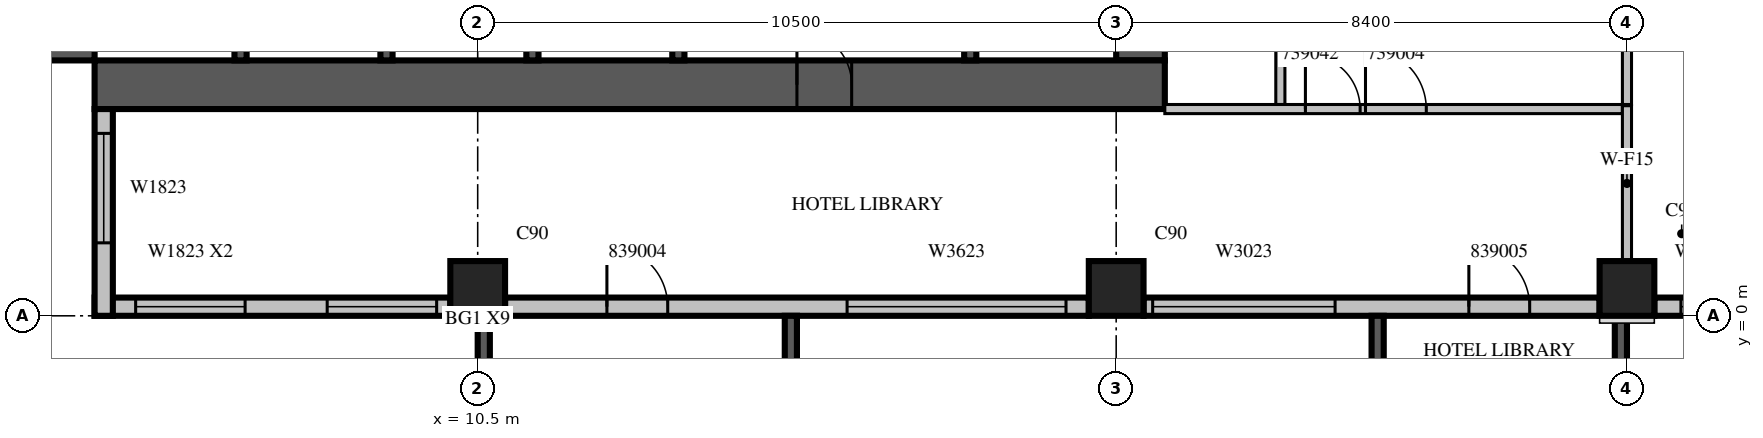
"""IFC4 building model, lengths in metres.
Left out: names, types, materials, properties, quantities, classifications, styles, units other than length and angle.
Written with IfcOpenShell. Run it as: python <this file> out.ifc"""

import sys

from ifc_helpers import new_model, si_unit, direction, frame, frame_2d, origin, origin_2d, place, context, subcontext, project, spatial, rectangle, extrude, source, transform, mapped, element, fill, save


model = new_model("IFC4")
c1 = context("Model", 3, precision=1e-05, world=origin(), true_north=direction((0.0, 1.0)))
c2 = subcontext(c1, "Body", "Model", "MODEL_VIEW")
j1 = project(units=[si_unit("LENGTHUNIT", "METRE"), si_unit("PLANEANGLEUNIT", "RADIAN")], contexts=[c1])
p1 = place(None, origin())
s1 = spatial("IfcSite", under=j1, at=p1, CompositionType="ELEMENT")
p2 = place(p1, origin())
s2 = spatial("IfcBuilding", under=s1, at=p2, CompositionType="ELEMENT")
p3 = place(p2, frame((0.0, 0.0, 181.6)))
s3 = spatial("IfcBuildingStorey", under=s2, at=p3, CompositionType="ELEMENT", Elevation=181.6)
m1 = source(origin(), c2, "Body", "SweptSolid", [
    extrude(rectangle(XDim=0.9, YDim=0.9, at=origin_2d()), origin(), (0.0, 0.0, 1.0), 3.8),
])
for number, where, z_axis, x_axis in (
    (1, (10.5, 0.45, 0.0), (0.0, 0.0, 1.0), (1.0, 0.0, 0.0)),
    (2, (21.0, 0.45, 0.0), (0.0, 0.0, 1.0), (1.0, 0.0, 0.0)),
    (3, (29.4, 0.45, 0.0), (0.0, 0.0, 1.0), (1.0, 0.0, 0.0)),
):
    element("IfcColumn", number, at=place(p3, frame(where, z_axis=z_axis, x_axis=x_axis)), inside=s3, PredefinedType="COLUMN", context=c2, shape_type="MappedRepresentation", body=[
        mapped(m1, transform((0.0, 0.0, 0.0), scale=1.0)),
    ])
m2 = source(origin(), c2, "Body", "SweptSolid", [
    extrude(rectangle(XDim=17.6, YDim=0.8, at=frame_2d((8.8, 0.0))), origin(), (0.0, 0.0, 1.0), 3.8),
])
p4 = place(p3, frame((3.8, 4.2, 0.0), z_axis=(0.0, 0.0, 1.0), x_axis=(0.0, 1.0, 0.0)))
e4 = element("IfcWall", 4, at=p4, inside=s3, PredefinedType="SHEAR", context=c2, shape_type="MappedRepresentation", body=[
    mapped(m2, transform((0.0, 0.0, 0.0), scale=1.0)),
])
m3 = source(origin(), c2, "Body", "SweptSolid", [
    extrude(rectangle(XDim=2.2, YDim=2.1, at=frame_2d((1.1, 1.05))), frame((0.0, 0.41, 0.0), z_axis=(0.0, -1.0, 0.0), x_axis=(1.0, 0.0, 0.0)), (0.0, 0.0, 1.0), 0.82),
])
p5 = place(p4, frame((4.2, 0.0, 0.0)))
e5 = element("IfcOpeningElement", 5, at=p5, cuts=e4, PredefinedType="OPENING", context=c2, shape_type="MappedRepresentation", body=[
    mapped(m3, transform((0.0, 0.0, 0.0), scale=1.0)),
])
m4 = source(origin(), c2, "Body", "SweptSolid", [
    extrude(rectangle(XDim=0.9, YDim=2.1, at=frame_2d((0.45, 1.05))), frame((0.0, 0.41, 0.0), z_axis=(0.0, -1.0, 0.0), x_axis=(1.0, 0.0, 0.0)), (0.0, 0.0, 1.0), 0.82),
])
p6 = place(p4, frame((10.95, 0.0, 0.0)))
e6 = element("IfcOpeningElement", 6, at=p6, cuts=e4, PredefinedType="OPENING", context=c2, shape_type="MappedRepresentation", body=[
    mapped(m4, transform((0.0, 0.0, 0.0), scale=1.0)),
])
m5 = source(origin(), c2, "Body", "SweptSolid", [
    extrude(rectangle(XDim=16.8, YDim=0.8, at=frame_2d((8.4, 0.0))), origin(), (0.0, 0.0, 1.0), 3.8),
])
p7 = place(p3, frame((21.4, 4.2, 0.0), z_axis=(0.0, 0.0, 1.0), x_axis=(0.0, 1.0, 0.0)))
e7 = element("IfcWall", 7, at=p7, inside=s3, PredefinedType="SHEAR", context=c2, shape_type="MappedRepresentation", body=[
    mapped(m5, transform((0.0, 0.0, 0.0), scale=1.0)),
])
p8 = place(p7, frame((4.2, 0.0, 0.0)))
e8 = element("IfcOpeningElement", 8, at=p8, cuts=e7, PredefinedType="OPENING", context=c2, shape_type="MappedRepresentation", body=[
    mapped(m3, transform((0.0, 0.0, 0.0), scale=1.0)),
])
m6 = source(origin(), c2, "Body", "SweptSolid", [
    extrude(rectangle(XDim=1.2, YDim=2.1, at=frame_2d((0.6, 1.05))), frame((0.0, 0.41, 0.0), z_axis=(0.0, -1.0, 0.0), x_axis=(1.0, 0.0, 0.0)), (0.0, 0.0, 1.0), 0.82),
])
p9 = place(p7, frame((14.7, 0.0, 0.0)))
e9 = element("IfcOpeningElement", 9, at=p9, cuts=e7, PredefinedType="OPENING", context=c2, shape_type="MappedRepresentation", body=[
    mapped(m6, transform((0.0, 0.0, 0.0), scale=1.0)),
])
p10 = place(p3, frame((4.2, 3.8, 0.0), z_axis=(0.0, 0.0, 1.0), x_axis=(1.0, 0.0, 0.0)))
e10 = element("IfcWall", 10, at=p10, inside=s3, PredefinedType="SHEAR", context=c2, shape_type="MappedRepresentation", body=[
    mapped(m2, transform((0.0, 0.0, 0.0), scale=1.0)),
])
p11 = place(p10, frame((11.55, 0.0, 0.0)))
e11 = element("IfcOpeningElement", 11, at=p11, cuts=e10, PredefinedType="OPENING", context=c2, shape_type="MappedRepresentation", body=[
    mapped(m4, transform((0.0, 0.0, 0.0), scale=1.0)),
])
p12 = place(p3, frame((4.2, 0.15, 0.0), z_axis=(0.0, 0.0, 1.0), x_axis=(1.0, 0.0, 0.0)))
e12 = element("IfcWall", 12, at=p12, inside=s3, PredefinedType="STANDARD", context=c2, shape_type="SweptSolid", body=[
    extrude(rectangle(XDim=5.85, YDim=0.3, at=frame_2d((2.925, 0.0))), origin(), (0.0, 0.0, 1.0), 3.4),
])
m7 = source(origin(), c2, "Body", "SweptSolid", [
    extrude(rectangle(XDim=1.8, YDim=2.3, at=frame_2d((0.9, 1.15))), frame((0.0, 0.16, 0.0), z_axis=(0.0, -1.0, 0.0), x_axis=(1.0, 0.0, 0.0)), (0.0, 0.0, 1.0), 0.32),
])
p13 = place(p12, frame((0.675, 0.0, 0.6)))
e13 = element("IfcOpeningElement", 13, at=p13, cuts=e12, PredefinedType="OPENING", context=c2, shape_type="MappedRepresentation", body=[
    mapped(m7, transform((0.0, 0.0, 0.0), scale=1.0)),
])
p14 = place(p12, frame((3.825, 0.0, 0.6)))
e14 = element("IfcOpeningElement", 14, at=p14, cuts=e12, PredefinedType="OPENING", context=c2, shape_type="MappedRepresentation", body=[
    mapped(m7, transform((0.0, 0.0, 0.0), scale=1.0)),
])
p15 = place(p3, frame((10.95, 0.15, 0.0), z_axis=(0.0, 0.0, 1.0), x_axis=(1.0, 0.0, 0.0)))
e15 = element("IfcWall", 15, at=p15, inside=s3, PredefinedType="STANDARD", context=c2, shape_type="SweptSolid", body=[
    extrude(rectangle(XDim=9.6, YDim=0.3, at=frame_2d((4.8, 0.0))), origin(), (0.0, 0.0, 1.0), 3.4),
])
m8 = source(origin(), c2, "Body", "SweptSolid", [
    extrude(rectangle(XDim=3.6, YDim=2.3, at=frame_2d((1.8, 1.15))), frame((0.0, 0.16, 0.0), z_axis=(0.0, -1.0, 0.0), x_axis=(1.0, 0.0, 0.0)), (0.0, 0.0, 1.0), 0.32),
])
p16 = place(p15, frame((5.625, 0.0, 0.6)))
e16 = element("IfcOpeningElement", 16, at=p16, cuts=e15, PredefinedType="OPENING", context=c2, shape_type="MappedRepresentation", body=[
    mapped(m8, transform((0.0, 0.0, 0.0), scale=1.0)),
])
m9 = source(origin(), c2, "Body", "SweptSolid", [
    extrude(rectangle(XDim=1.0, YDim=2.1, at=frame_2d((0.5, 1.05))), frame((0.0, 0.16, 0.0), z_axis=(0.0, -1.0, 0.0), x_axis=(1.0, 0.0, 0.0)), (0.0, 0.0, 1.0), 0.32),
])
p17 = place(p15, frame((1.675, 0.0, 0.0)))
e17 = element("IfcOpeningElement", 17, at=p17, cuts=e15, PredefinedType="OPENING", context=c2, shape_type="MappedRepresentation", body=[
    mapped(m9, transform((0.0, 0.0, 0.0), scale=1.0)),
])
m10 = source(origin(), c2, "Body", "SweptSolid", [
    extrude(rectangle(XDim=7.5, YDim=0.3, at=frame_2d((3.75, 0.0))), origin(), (0.0, 0.0, 1.0), 3.4),
])
p18 = place(p3, frame((21.45, 0.15, 0.0), z_axis=(0.0, 0.0, 1.0), x_axis=(1.0, 0.0, 0.0)))
e18 = element("IfcWall", 18, at=p18, inside=s3, PredefinedType="STANDARD", context=c2, shape_type="MappedRepresentation", body=[
    mapped(m10, transform((0.0, 0.0, 0.0), scale=1.0)),
])
m11 = source(origin(), c2, "Body", "SweptSolid", [
    extrude(rectangle(XDim=3.0, YDim=2.3, at=frame_2d((1.5, 1.15))), frame((0.0, 0.16, 0.0), z_axis=(0.0, -1.0, 0.0), x_axis=(1.0, 0.0, 0.0)), (0.0, 0.0, 1.0), 0.32),
])
p19 = place(p18, frame((0.15, 0.0, 0.6)))
e19 = element("IfcOpeningElement", 19, at=p19, cuts=e18, PredefinedType="OPENING", context=c2, shape_type="MappedRepresentation", body=[
    mapped(m11, transform((0.0, 0.0, 0.0), scale=1.0)),
])
p20 = place(p18, frame((5.35, 0.0, 0.0)))
e20 = element("IfcOpeningElement", 20, at=p20, cuts=e18, PredefinedType="OPENING", context=c2, shape_type="MappedRepresentation", body=[
    mapped(m9, transform((0.0, 0.0, 0.0), scale=1.0)),
])
p21 = place(p3, frame((29.85, 0.15, 0.0), z_axis=(0.0, 0.0, 1.0), x_axis=(1.0, 0.0, 0.0)))
e21 = element("IfcWall", 21, at=p21, inside=s3, PredefinedType="STANDARD", context=c2, shape_type="MappedRepresentation", body=[
    mapped(m10, transform((0.0, 0.0, 0.0), scale=1.0)),
])
m12 = source(origin(), c2, "Body", "SweptSolid", [
    extrude(rectangle(XDim=1.2, YDim=2.3, at=frame_2d((0.6, 1.15))), frame((0.0, 0.16, 0.0), z_axis=(0.0, -1.0, 0.0), x_axis=(1.0, 0.0, 0.0)), (0.0, 0.0, 1.0), 0.32),
])
p22 = place(p21, frame((0.438, 0.0, 0.6)))
e22 = element("IfcOpeningElement", 22, at=p22, cuts=e21, PredefinedType="OPENING", context=c2, shape_type="MappedRepresentation", body=[
    mapped(m12, transform((0.0, 0.0, 0.0), scale=1.0)),
])
p23 = place(p21, frame((5.963, 0.0, 0.6)))
e23 = element("IfcOpeningElement", 23, at=p23, cuts=e21, PredefinedType="OPENING", context=c2, shape_type="MappedRepresentation", body=[
    mapped(m12, transform((0.0, 0.0, 0.0), scale=1.0)),
])
m13 = source(origin(), c2, "Body", "SweptSolid", [
    extrude(rectangle(XDim=3.4, YDim=0.3, at=frame_2d((1.7, 0.0))), origin(), (0.0, 0.0, 1.0), 3.4),
])
p24 = place(p3, frame((4.35, 3.4, 0.0), z_axis=(0.0, 0.0, 1.0), x_axis=(0.0, -1.0, 0.0)))
e24 = element("IfcWall", 24, at=p24, inside=s3, PredefinedType="STANDARD", context=c2, shape_type="MappedRepresentation", body=[
    mapped(m13, transform((0.0, 0.0, 0.0), scale=1.0)),
])
p25 = place(p24, frame((0.4, 0.0, 0.6)))
e25 = element("IfcOpeningElement", 25, at=p25, cuts=e24, PredefinedType="OPENING", context=c2, shape_type="MappedRepresentation", body=[
    mapped(m7, transform((0.0, 0.0, 0.0), scale=1.0)),
])
m14 = source(origin(), c2, "Body", "SweptSolid", [
    extrude(rectangle(XDim=3.9, YDim=0.2, at=frame_2d((1.95, 0.0))), origin(), (0.0, 0.0, 1.0), 3.39),
])
p26 = place(p3, frame((10.6, 0.0, 0.0), z_axis=(0.0, 0.0, 1.0), x_axis=(0.0, -1.0, 0.0)))
e26 = element("IfcWall", 26, at=p26, inside=s3, PredefinedType="SOLIDWALL", context=c2, shape_type="MappedRepresentation", body=[
    mapped(m14, transform((0.0, 0.0, 0.0), scale=1.0)),
])
m15 = source(origin(), c2, "Body", "SweptSolid", [
    extrude(rectangle(XDim=2.4, YDim=2.3, at=frame_2d((1.2, 1.15))), frame((0.0, 0.11, 0.0), z_axis=(0.0, -1.0, 0.0), x_axis=(1.0, 0.0, 0.0)), (0.0, 0.0, 1.0), 0.22),
])
p27 = place(p26, frame((0.75, 0.0, 0.6)))
e27 = element("IfcOpeningElement", 27, at=p27, cuts=e26, PredefinedType="OPENING", context=c2, shape_type="MappedRepresentation", body=[
    mapped(m15, transform((0.0, 0.0, 0.0), scale=1.0)),
])
p28 = place(p3, frame((15.65, 0.0, 0.0), z_axis=(0.0, 0.0, 1.0), x_axis=(0.0, -1.0, 0.0)))
e28 = element("IfcWall", 28, at=p28, inside=s3, PredefinedType="SOLIDWALL", context=c2, shape_type="MappedRepresentation", body=[
    mapped(m14, transform((0.0, 0.0, 0.0), scale=1.0)),
])
p29 = place(p28, frame((0.75, 0.0, 0.6)))
e29 = element("IfcOpeningElement", 29, at=p29, cuts=e28, PredefinedType="OPENING", context=c2, shape_type="MappedRepresentation", body=[
    mapped(m15, transform((0.0, 0.0, 0.0), scale=1.0)),
])
p30 = place(p3, frame((25.3, 0.0, 0.0), z_axis=(0.0, 0.0, 1.0), x_axis=(0.0, -1.0, 0.0)))
e30 = element("IfcWall", 30, at=p30, inside=s3, PredefinedType="SOLIDWALL", context=c2, shape_type="MappedRepresentation", body=[
    mapped(m14, transform((0.0, 0.0, 0.0), scale=1.0)),
])
p31 = place(p30, frame((0.75, 0.0, 0.6)))
e31 = element("IfcOpeningElement", 31, at=p31, cuts=e30, PredefinedType="OPENING", context=c2, shape_type="MappedRepresentation", body=[
    mapped(m15, transform((0.0, 0.0, 0.0), scale=1.0)),
])
p32 = place(p3, frame((29.3, 0.0, 0.0), z_axis=(0.0, 0.0, 1.0), x_axis=(0.0, -1.0, 0.0)))
e32 = element("IfcWall", 32, at=p32, inside=s3, PredefinedType="SOLIDWALL", context=c2, shape_type="MappedRepresentation", body=[
    mapped(m14, transform((0.0, 0.0, 0.0), scale=1.0)),
])
p33 = place(p32, frame((0.75, 0.0, 0.6)))
e33 = element("IfcOpeningElement", 33, at=p33, cuts=e32, PredefinedType="OPENING", context=c2, shape_type="MappedRepresentation", body=[
    mapped(m15, transform((0.0, 0.0, 0.0), scale=1.0)),
])
m16 = source(origin(), c2, "Body", "SweptSolid", [
    extrude(rectangle(XDim=3.1, YDim=0.2, at=frame_2d((1.55, 0.0))), origin(), (0.0, 0.0, 1.0), 3.8),
])
for number, where, z_axis, x_axis in (
    (34, (6.6, 4.2, 0.0), (0.0, 0.0, 1.0), (0.0, 1.0, 0.0)),
    (35, (9.0, 4.2, 0.0), (0.0, 0.0, 1.0), (0.0, 1.0, 0.0)),
    (36, (11.4, 4.2, 0.0), (0.0, 0.0, 1.0), (0.0, 1.0, 0.0)),
):
    element("IfcWall", number, at=place(p3, frame(where, z_axis=z_axis, x_axis=x_axis)), inside=s3, PredefinedType="SOLIDWALL", context=c2, shape_type="MappedRepresentation", body=[
        mapped(m16, transform((0.0, 0.0, 0.0), scale=1.0)),
    ])
m17 = source(origin(), c2, "Body", "SweptSolid", [
    extrude(rectangle(XDim=3.1, YDim=0.2, at=frame_2d((1.55, 0.0))), origin(), (0.0, 0.0, 1.0), 3.4),
])
for number, where, z_axis, x_axis in (
    (37, (13.8, 4.2, 0.0), (0.0, 0.0, 1.0), (0.0, 1.0, 0.0)),
    (38, (18.6, 4.2, 0.0), (0.0, 0.0, 1.0), (0.0, 1.0, 0.0)),
):
    element("IfcWall", number, at=place(p3, frame(where, z_axis=z_axis, x_axis=x_axis)), inside=s3, PredefinedType="SOLIDWALL", context=c2, shape_type="MappedRepresentation", body=[
        mapped(m17, transform((0.0, 0.0, 0.0), scale=1.0)),
    ])
p34 = place(p3, frame((23.7, 15.0, 0.0), z_axis=(0.0, 0.0, 1.0), x_axis=(0.0, -1.0, 0.0)))
e39 = element("IfcWall", 39, at=p34, inside=s3, PredefinedType="PARTITIONING", context=c2, shape_type="SweptSolid", body=[
    extrude(rectangle(XDim=11.525, YDim=0.15, at=frame_2d((5.763, 0.0))), origin(), (0.0, 0.0, 1.0), 3.4),
])
m18 = source(origin(), c2, "Body", "SweptSolid", [
    extrude(rectangle(XDim=0.9, YDim=2.1, at=frame_2d((0.45, 1.05))), frame((0.0, 0.085, 0.0), z_axis=(0.0, -1.0, 0.0), x_axis=(1.0, 0.0, 0.0)), (0.0, 0.0, 1.0), 0.17),
])
p35 = place(p34, frame((9.363, 0.0, 0.0)))
e40 = element("IfcOpeningElement", 40, at=p35, cuts=e39, PredefinedType="OPENING", context=c2, shape_type="MappedRepresentation", body=[
    mapped(m18, transform((0.0, 0.0, 0.0), scale=1.0)),
])
p36 = place(p34, frame((2.725, 0.0, 0.0)))
e41 = element("IfcOpeningElement", 41, at=p36, cuts=e39, PredefinedType="OPENING", context=c2, shape_type="MappedRepresentation", body=[
    mapped(m18, transform((0.0, 0.0, 0.0), scale=1.0)),
])
m19 = source(origin(), c2, "Body", "SweptSolid", [
    extrude(rectangle(XDim=6.576, YDim=0.15, at=frame_2d((3.288, 0.0))), origin(), (0.0, 0.0, 1.0), 3.4),
])
p37 = place(p3, frame((29.4, 3.475, 0.0), z_axis=(0.0, 0.0, 1.0), x_axis=(0.0, 1.0, 0.0)))
e42 = element("IfcWall", 42, at=p37, inside=s3, PredefinedType="PARTITIONING", context=c2, shape_type="MappedRepresentation", body=[
    mapped(m19, transform((0.0, 0.0, 0.0), scale=1.0)),
])
p38 = place(p3, frame((21.8, 3.4, 0.0), z_axis=(0.0, 0.0, 1.0), x_axis=(1.0, 0.0, 0.0)))
e43 = element("IfcWall", 43, at=p38, inside=s3, PredefinedType="PARTITIONING", context=c2, shape_type="SweptSolid", body=[
    extrude(rectangle(XDim=7.525, YDim=0.15, at=frame_2d((3.763, 0.0))), origin(), (0.0, 0.0, 1.0), 3.4),
])
m20 = source(origin(), c2, "Body", "SweptSolid", [
    extrude(rectangle(XDim=1.0, YDim=2.1, at=frame_2d((0.5, 1.05))), frame((0.0, 0.085, 0.0), z_axis=(0.0, -1.0, 0.0), x_axis=(1.0, 0.0, 0.0)), (0.0, 0.0, 1.0), 0.17),
])
p39 = place(p38, frame((3.3, 0.0, 0.0)))
e44 = element("IfcOpeningElement", 44, at=p39, cuts=e43, PredefinedType="OPENING", context=c2, shape_type="MappedRepresentation", body=[
    mapped(m20, transform((0.0, 0.0, 0.0), scale=1.0)),
])
p40 = place(p38, frame((2.312, 0.0, 0.0)))
e45 = element("IfcOpeningElement", 45, at=p40, cuts=e43, PredefinedType="OPENING", context=c2, shape_type="MappedRepresentation", body=[
    mapped(m18, transform((0.0, 0.0, 0.0), scale=1.0)),
])
m21 = source(origin(), c2, "Body", "SweptSolid", [
    extrude(rectangle(XDim=2.556, YDim=0.15, at=frame_2d((1.278, 0.0))), origin(), (0.0, 0.0, 1.0), 3.4),
])
p41 = place(p3, frame((29.4, 0.899, 0.0), z_axis=(0.0, 0.0, 1.0), x_axis=(0.0, 1.0, 0.0)))
e46 = element("IfcWall", 46, at=p41, inside=s3, PredefinedType="PARTITIONING", context=c2, shape_type="MappedRepresentation", body=[
    mapped(m21, transform((0.0, 0.0, 0.0), scale=1.0)),
])
m22 = source(origin(), c2, "Body", "SweptSolid", [
    extrude(rectangle(XDim=1.8, YDim=2.3, at=frame_2d((0.9, 1.15))), frame((0.0, 0.03, 0.0), z_axis=(0.0, -1.0, 0.0), x_axis=(1.0, 0.0, 0.0)), (0.0, 0.0, 1.0), 0.06),
])
p42 = place(p13, origin())
e47 = element("IfcWindow", 47, at=p42, inside=s3, PartitioningType="SINGLE_PANEL", PredefinedType="WINDOW", context=c2, shape_type="MappedRepresentation", body=[
    mapped(m22, transform((0.0, 0.0, 0.0), scale=1.0)),
])
fill(e13, e47)
p43 = place(p14, origin())
e48 = element("IfcWindow", 48, at=p43, inside=s3, PartitioningType="SINGLE_PANEL", PredefinedType="WINDOW", context=c2, shape_type="MappedRepresentation", body=[
    mapped(m22, transform((0.0, 0.0, 0.0), scale=1.0)),
])
fill(e14, e48)
m23 = source(origin(), c2, "Body", "SweptSolid", [
    extrude(rectangle(XDim=3.6, YDim=2.3, at=frame_2d((1.8, 1.15))), frame((0.0, 0.03, 0.0), z_axis=(0.0, -1.0, 0.0), x_axis=(1.0, 0.0, 0.0)), (0.0, 0.0, 1.0), 0.06),
])
p44 = place(p16, origin())
e49 = element("IfcWindow", 49, at=p44, inside=s3, PartitioningType="SINGLE_PANEL", PredefinedType="WINDOW", context=c2, shape_type="MappedRepresentation", body=[
    mapped(m23, transform((0.0, 0.0, 0.0), scale=1.0)),
])
fill(e16, e49)
m24 = source(origin(), c2, "Body", "SweptSolid", [
    extrude(rectangle(XDim=3.0, YDim=2.3, at=frame_2d((1.5, 1.15))), frame((0.0, 0.03, 0.0), z_axis=(0.0, -1.0, 0.0), x_axis=(1.0, 0.0, 0.0)), (0.0, 0.0, 1.0), 0.06),
])
p45 = place(p19, origin())
e50 = element("IfcWindow", 50, at=p45, inside=s3, PartitioningType="SINGLE_PANEL", PredefinedType="WINDOW", context=c2, shape_type="MappedRepresentation", body=[
    mapped(m24, transform((0.0, 0.0, 0.0), scale=1.0)),
])
fill(e19, e50)
m25 = source(origin(), c2, "Body", "SweptSolid", [
    extrude(rectangle(XDim=1.2, YDim=2.3, at=frame_2d((0.6, 1.15))), frame((0.0, 0.03, 0.0), z_axis=(0.0, -1.0, 0.0), x_axis=(1.0, 0.0, 0.0)), (0.0, 0.0, 1.0), 0.06),
])
p46 = place(p22, origin())
e51 = element("IfcWindow", 51, at=p46, inside=s3, PartitioningType="SINGLE_PANEL", PredefinedType="WINDOW", context=c2, shape_type="MappedRepresentation", body=[
    mapped(m25, transform((0.0, 0.0, 0.0), scale=1.0)),
])
fill(e22, e51)
p47 = place(p25, origin())
e52 = element("IfcWindow", 52, at=p47, inside=s3, PartitioningType="SINGLE_PANEL", PredefinedType="WINDOW", context=c2, shape_type="MappedRepresentation", body=[
    mapped(m22, transform((0.0, 0.0, 0.0), scale=1.0)),
])
fill(e25, e52)
m26 = source(origin(), c2, "Body", "SweptSolid", [
    extrude(rectangle(XDim=0.9, YDim=2.1, at=frame_2d((0.45, 1.05))), frame((0.0, 0.025, 0.0), z_axis=(0.0, -1.0, 0.0), x_axis=(1.0, 0.0, 0.0)), (0.0, 0.0, 1.0), 0.05),
])
p48 = place(p11, origin())
e53 = element("IfcDoor", 53, at=p48, inside=s3, OperationType="SINGLE_SWING_LEFT", PredefinedType="DOOR", context=c2, shape_type="MappedRepresentation", body=[
    mapped(m26, transform((0.0, 0.0, 0.0), scale=1.0)),
])
fill(e11, e53)
m27 = source(origin(), c2, "Body", "SweptSolid", [
    extrude(rectangle(XDim=1.0, YDim=2.1, at=frame_2d((0.5, 1.05))), frame((0.0, 0.025, 0.0), z_axis=(0.0, -1.0, 0.0), x_axis=(1.0, 0.0, 0.0)), (0.0, 0.0, 1.0), 0.05),
])
p49 = place(p39, origin())
e54 = element("IfcDoor", 54, at=p49, inside=s3, OperationType="SINGLE_SWING_LEFT", PredefinedType="DOOR", context=c2, shape_type="MappedRepresentation", body=[
    mapped(m27, transform((0.0, 0.0, 0.0), scale=1.0)),
])
fill(e44, e54)
p50 = place(p40, origin())
e55 = element("IfcDoor", 55, at=p50, inside=s3, OperationType="SINGLE_SWING_LEFT", PredefinedType="DOOR", context=c2, shape_type="MappedRepresentation", body=[
    mapped(m26, transform((0.0, 0.0, 0.0), scale=1.0)),
])
fill(e45, e55)
p51 = place(p17, origin())
e56 = element("IfcDoor", 56, at=p51, inside=s3, OperationType="SINGLE_SWING_LEFT", PredefinedType="DOOR", context=c2, shape_type="MappedRepresentation", body=[
    mapped(m27, transform((0.0, 0.0, 0.0), scale=1.0)),
])
fill(e17, e56)
p52 = place(p20, origin())
e57 = element("IfcDoor", 57, at=p52, inside=s3, OperationType="SINGLE_SWING_LEFT", PredefinedType="DOOR", context=c2, shape_type="MappedRepresentation", body=[
    mapped(m27, transform((0.0, 0.0, 0.0), scale=1.0)),
])
fill(e20, e57)
save(model, sys.argv[1])
